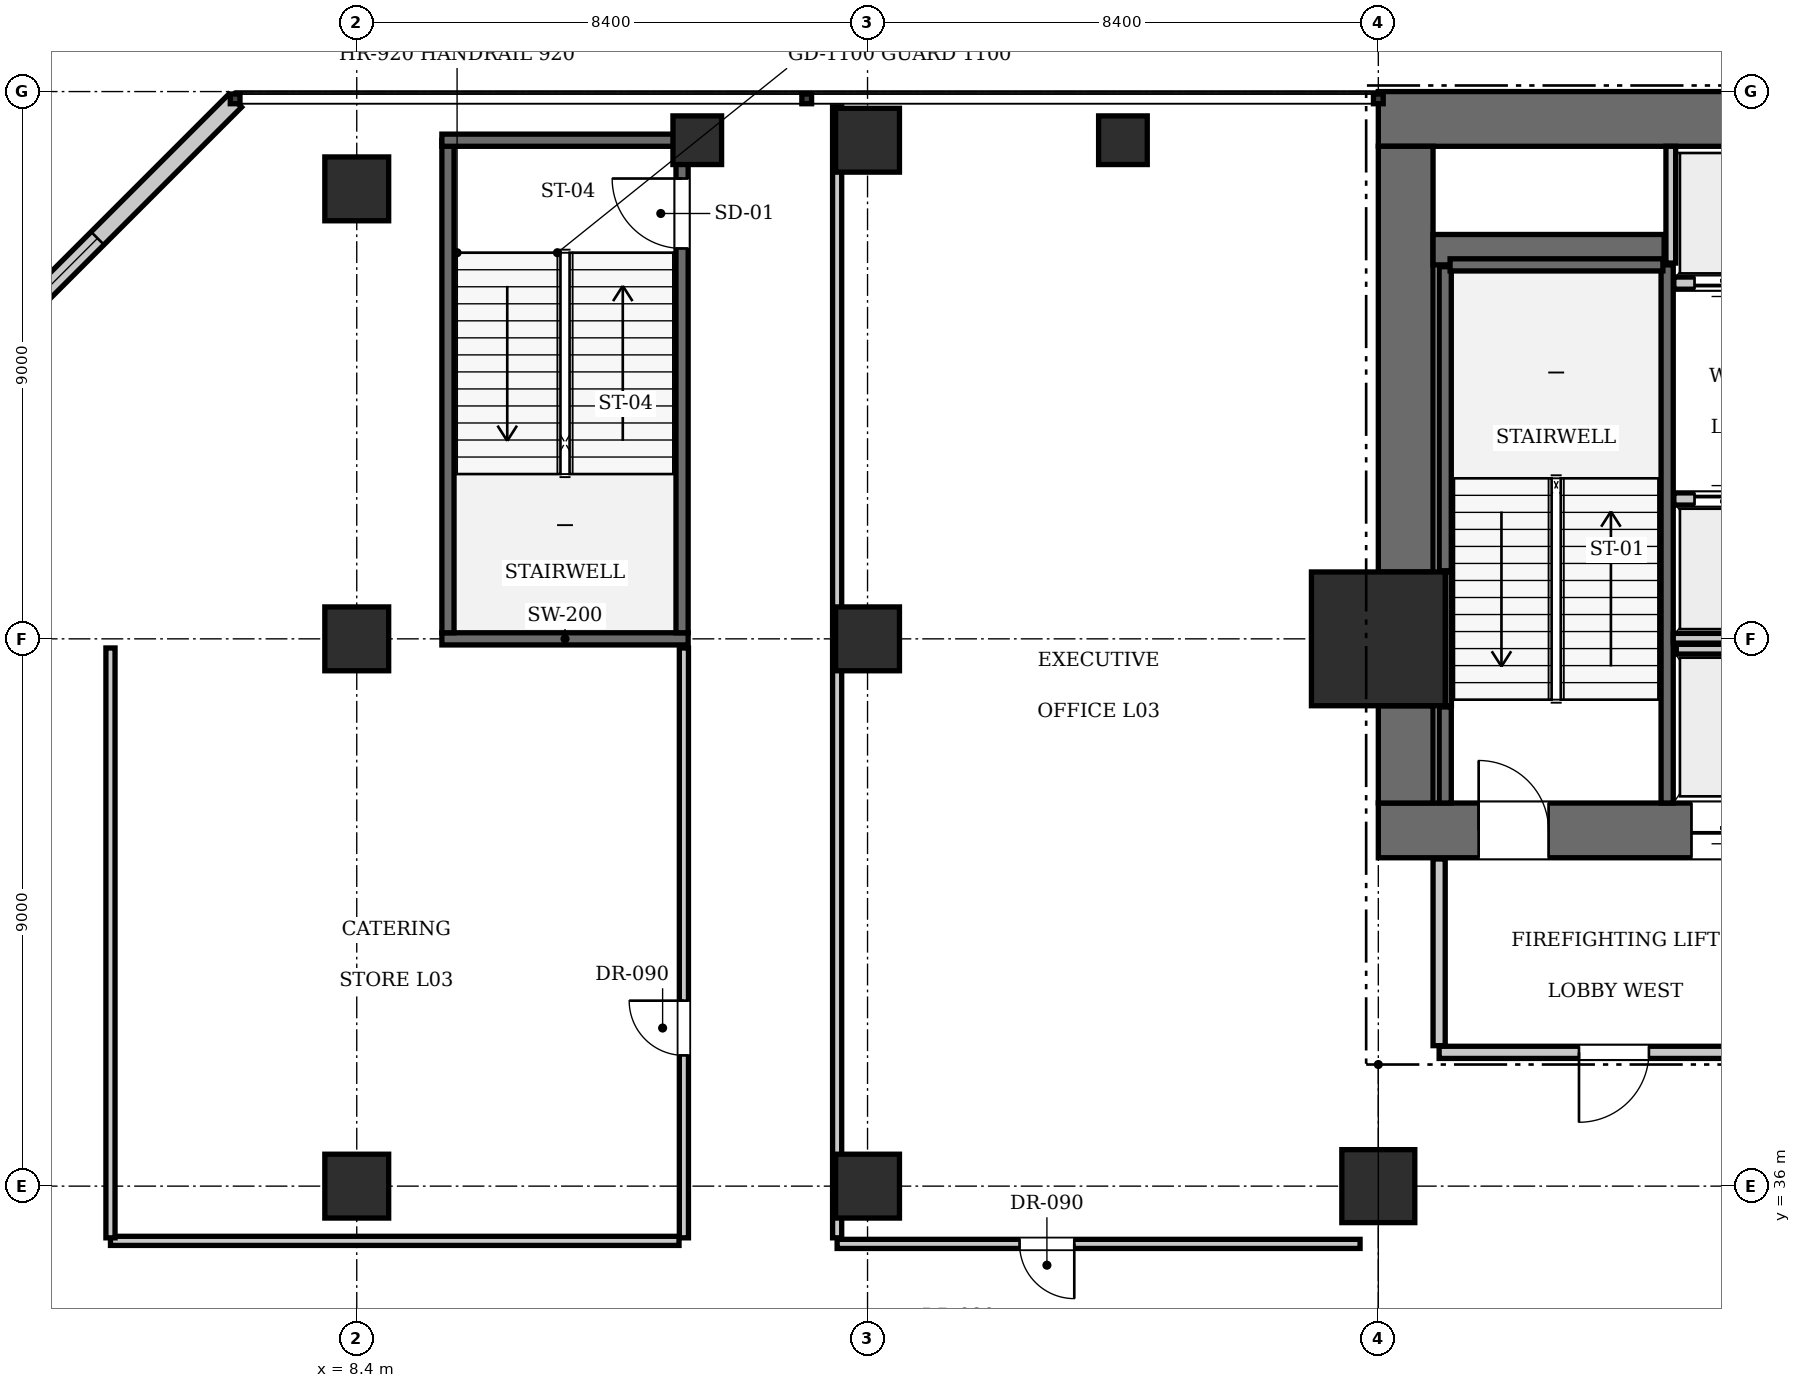
"""IFC4 building model, lengths in metres.
Left out: names, types, materials, properties, quantities, classifications, styles, units other than length and angle.
Written with IfcOpenShell. Run it as: python <this file> out.ifc"""

import sys

from ifc_helpers import new_model, si_unit, direction, frame, frame_2d, origin, origin_2d, place, context, subcontext, project, spatial, rectangle, extrude, element, fill, save


model = new_model("IFC4")
c1 = context("Model", 3, precision=1e-05, world=origin(), true_north=direction((0.0, 1.0)))
c2 = subcontext(c1, "Body", "Model", "MODEL_VIEW")
j1 = project(units=[si_unit("LENGTHUNIT", "METRE"), si_unit("PLANEANGLEUNIT", "RADIAN")], contexts=[c1])
p1 = place(None, origin())
s1 = spatial("IfcSite", under=j1, at=p1, CompositionType="ELEMENT")
p2 = place(p1, origin())
s2 = spatial("IfcBuilding", under=s1, at=p2, CompositionType="ELEMENT")
p3 = place(p2, frame((0.0, 0.0, 16.45)))
s3 = spatial("IfcBuildingStorey", under=s2, at=p3, CompositionType="ELEMENT", Elevation=16.45)
p4 = place(p3, frame((25.2, 45.0, 0.0), z_axis=(0.0, 0.0, 1.0), x_axis=(1.0, 0.0, 0.0)))
e1 = element("IfcColumn", 1, at=p4, inside=s3, PredefinedType="COLUMN", context=c2, shape_type="SweptSolid", body=[
    extrude(rectangle(XDim=2.2, YDim=2.2, at=origin_2d()), origin(), (0.0, 0.0, 1.0), 4.9),
])
p5 = place(p3, frame((25.2, 53.55, 0.0), z_axis=(0.0, 0.0, 1.0), x_axis=(1.0, 0.0, 0.0)))
e2 = element("IfcWall", 2, at=p5, inside=s3, PredefinedType="SHEAR", context=c2, shape_type="SweptSolid", body=[
    extrude(rectangle(XDim=25.2, YDim=0.9, at=frame_2d((12.6, 0.0))), origin(), (0.0, 0.0, 1.0), 4.9),
])
p6 = place(p3, frame((25.2, 41.85, 0.0), z_axis=(0.0, 0.0, 1.0), x_axis=(1.0, 0.0, 0.0)))
e3 = element("IfcWall", 3, at=p6, inside=s3, PredefinedType="SHEAR", context=c2, shape_type="SweptSolid", body=[
    extrude(rectangle(XDim=6.8, YDim=0.9, at=frame_2d((3.4, 0.0))), origin(), (0.0, 0.0, 1.0), 4.9),
])
p7 = place(p6, frame((1.65, 0.0, 0.0)))
e4 = element("IfcOpeningElement", 4, at=p7, cuts=e3, PredefinedType="OPENING", context=c2, shape_type="SweptSolid", body=[
    extrude(rectangle(XDim=1.15, YDim=2.15, at=frame_2d((0.575, 1.075))), frame((0.0, 0.46, 0.0), z_axis=(0.0, -1.0, 0.0), x_axis=(1.0, 0.0, 0.0)), (0.0, 0.0, 1.0), 0.92),
])
p8 = place(p6, frame((5.15, 0.0, 0.0)))
e5 = element("IfcOpeningElement", 5, at=p8, cuts=e3, PredefinedType="OPENING", context=c2, shape_type="SweptSolid", body=[
    extrude(rectangle(XDim=1.1, YDim=2.2, at=frame_2d((0.55, 1.1))), frame((0.0, 0.46, 0.0), z_axis=(0.0, -1.0, 0.0), x_axis=(1.0, 0.0, 0.0)), (0.0, 0.0, 1.0), 0.92),
])
p9 = place(p3, frame((25.65, 42.3, 0.0), z_axis=(0.0, 0.0, 1.0), x_axis=(0.0, 1.0, 0.0)))
e6 = element("IfcWall", 6, at=p9, inside=s3, PredefinedType="SHEAR", context=c2, shape_type="SweptSolid", body=[
    extrude(rectangle(XDim=1.6, YDim=0.9, at=frame_2d((0.8, 0.0))), origin(), (0.0, 0.0, 1.0), 4.9),
])
p10 = place(p3, frame((25.65, 46.1, 0.0), z_axis=(0.0, 0.0, 1.0), x_axis=(0.0, 1.0, 0.0)))
e7 = element("IfcWall", 7, at=p10, inside=s3, PredefinedType="SHEAR", context=c2, shape_type="SweptSolid", body=[
    extrude(rectangle(XDim=7.0, YDim=0.9, at=frame_2d((3.5, 0.0))), origin(), (0.0, 0.0, 1.0), 4.9),
])
p11 = place(p3, frame((26.1, 51.4, 0.0), z_axis=(0.0, 0.0, 1.0), x_axis=(1.0, 0.0, 0.0)))
e8 = element("IfcWall", 8, at=p11, inside=s3, PredefinedType="SHEAR", context=c2, shape_type="SweptSolid", body=[
    extrude(rectangle(XDim=3.8, YDim=0.5, at=frame_2d((1.9, 0.0))), origin(), (0.0, 0.0, 1.0), 4.9),
])
p12 = place(p3, frame((25.2, 36.0, 0.0), z_axis=(0.0, 0.0, 1.0), x_axis=(1.0, 0.0, 0.0)))
e9 = element("IfcColumn", 9, at=p12, inside=s3, PredefinedType="COLUMN", context=c2, shape_type="SweptSolid", body=[
    extrude(rectangle(XDim=1.2, YDim=1.2, at=origin_2d()), origin(), (0.0, 0.0, 1.0), 4.9),
])
for number, where, z_axis, x_axis in (
    (10, (16.8, 36.0, 0.0), (0.0, 0.0, 1.0), (1.0, 0.0, 0.0)),
    (11, (16.8, 45.0, 0.0), (0.0, 0.0, 1.0), (1.0, 0.0, 0.0)),
    (12, (8.4, 36.0, 0.0), (0.0, 0.0, 1.0), (1.0, 0.0, 0.0)),
    (13, (8.4, 45.0, 0.0), (0.0, 0.0, 1.0), (1.0, 0.0, 0.0)),
    (14, (8.4, 52.4, 0.0), (0.0, 0.0, 1.0), (1.0, 0.0, 0.0)),
    (15, (16.8, 53.2, 0.0), (0.0, 0.0, 1.0), (1.0, 0.0, 0.0)),
):
    element("IfcColumn", number, at=place(p3, frame(where, z_axis=z_axis, x_axis=x_axis)), inside=s3, PredefinedType="COLUMN", context=c2, shape_type="SweptSolid", body=[
        extrude(rectangle(XDim=1.05, YDim=1.05, at=origin_2d()), origin(), (0.0, 0.0, 1.0), 4.9),
    ])
for number, where, z_axis, x_axis in (
    (16, (14.0, 53.2, 0.0), (0.0, 0.0, 1.0), (1.0, 0.0, 0.0)),
    (17, (21.0, 53.2, 0.0), (0.0, 0.0, 1.0), (1.0, 0.0, 0.0)),
):
    element("IfcColumn", number, at=place(p3, frame(where, z_axis=z_axis, x_axis=x_axis)), inside=s3, PredefinedType="PILASTER", context=c2, shape_type="SweptSolid", body=[
        extrude(rectangle(XDim=0.8, YDim=0.8, at=origin_2d()), origin(), (0.0, 0.0, 1.0), 4.9),
    ])
p13 = place(p3, frame((29.95, 42.3, 0.0), z_axis=(0.0, 0.0, 1.0), x_axis=(0.0, 1.0, 0.0)))
e18 = element("IfcWall", 18, at=p13, inside=s3, PredefinedType="SOLIDWALL", context=c2, shape_type="SweptSolid", body=[
    extrude(rectangle(XDim=8.85, YDim=0.2, at=frame_2d((4.425, 0.0))), origin(), (0.0, 0.0, 1.0), 4.62),
])
p14 = place(p3, frame((26.3, 42.3, 0.0), z_axis=(0.0, 0.0, 1.0), x_axis=(0.0, 1.0, 0.0)))
e19 = element("IfcWall", 19, at=p14, inside=s3, PredefinedType="SOLIDWALL", context=c2, shape_type="SweptSolid", body=[
    extrude(rectangle(XDim=1.58, YDim=0.2, at=frame_2d((0.79, 0.0))), origin(), (0.0, 0.0, 1.0), 4.62),
])
p15 = place(p3, frame((26.3, 46.12, 0.0), z_axis=(0.0, 0.0, 1.0), x_axis=(0.0, 1.0, 0.0)))
e20 = element("IfcWall", 20, at=p15, inside=s3, PredefinedType="SOLIDWALL", context=c2, shape_type="SweptSolid", body=[
    extrude(rectangle(XDim=5.0, YDim=0.2, at=frame_2d((2.5, 0.0))), origin(), (0.0, 0.0, 1.0), 4.62),
])
p16 = place(p3, frame((26.38, 51.15, 0.0), z_axis=(0.0, 0.0, 1.0), x_axis=(1.0, 0.0, 0.0)))
e21 = element("IfcWall", 21, at=p16, inside=s3, PredefinedType="SOLIDWALL", context=c2, shape_type="SweptSolid", body=[
    extrude(rectangle(XDim=3.5, YDim=0.2, at=frame_2d((1.75, 0.0))), origin(), (0.0, 0.0, 1.0), 4.62),
])
p17 = place(p3, frame((26.352, 43.9, 0.0), z_axis=(0.0, 0.0, 1.0), x_axis=(0.0, 1.0, 0.0)))
e22 = element("IfcWall", 22, at=p17, inside=s3, PredefinedType="SOLIDWALL", context=c2, shape_type="SweptSolid", body=[
    extrude(rectangle(XDim=2.2, YDim=0.1, at=frame_2d((1.1, 0.0))), origin(), (0.0, 0.0, 1.0), 4.62),
])
p18 = place(p3, frame((9.8, 45.0, 0.0), z_axis=(0.0, 0.0, 1.0), x_axis=(1.0, 0.0, 0.0)))
e23 = element("IfcWall", 23, at=p18, inside=s3, PredefinedType="SOLIDWALL", context=c2, shape_type="SweptSolid", body=[
    extrude(rectangle(XDim=4.05, YDim=0.2, at=frame_2d((2.025, 0.0))), origin(), (0.0, 0.0, 1.0), 3.985),
])
p19 = place(p3, frame((9.9, 45.1, 0.0), z_axis=(0.0, 0.0, 1.0), x_axis=(0.0, 1.0, 0.0)))
e24 = element("IfcWall", 24, at=p19, inside=s3, PredefinedType="SOLIDWALL", context=c2, shape_type="SweptSolid", body=[
    extrude(rectangle(XDim=8.1, YDim=0.2, at=frame_2d((4.05, 0.0))), origin(), (0.0, 0.0, 1.0), 4.62),
])
p20 = place(p3, frame((13.75, 45.1, 0.0), z_axis=(0.0, 0.0, 1.0), x_axis=(0.0, 1.0, 0.0)))
e25 = element("IfcWall", 25, at=p20, inside=s3, PredefinedType="SOLIDWALL", context=c2, shape_type="SweptSolid", body=[
    extrude(rectangle(XDim=8.1, YDim=0.2, at=frame_2d((4.05, 0.0))), origin(), (0.0, 0.0, 1.0), 4.62),
])
p21 = place(p20, frame((6.32, 0.0, 0.0)))
e26 = element("IfcOpeningElement", 26, at=p21, cuts=e25, PredefinedType="OPENING", context=c2, shape_type="SweptSolid", body=[
    extrude(rectangle(XDim=1.15, YDim=2.15, at=frame_2d((0.575, 1.075))), frame((0.0, 0.11, 0.0), z_axis=(0.0, -1.0, 0.0), x_axis=(1.0, 0.0, 0.0)), (0.0, 0.0, 1.0), 0.22),
])
p22 = place(p3, frame((9.8, 53.2, 0.0), z_axis=(0.0, 0.0, 1.0), x_axis=(1.0, 0.0, 0.0)))
e27 = element("IfcWall", 27, at=p22, inside=s3, PredefinedType="SOLIDWALL", context=c2, shape_type="SweptSolid", body=[
    extrude(rectangle(XDim=4.05, YDim=0.2, at=frame_2d((2.025, 0.0))), origin(), (0.0, 0.0, 1.0), 4.62),
])
p23 = place(p3, frame((30.06, 47.3, 0.0), z_axis=(0.0, 0.0, 1.0), x_axis=(1.0, 0.0, 0.0)))
e28 = element("IfcWall", 28, at=p23, inside=s3, PredefinedType="SOLIDWALL", context=c2, shape_type="SweptSolid", body=[
    extrude(rectangle(XDim=1.68, YDim=0.2, at=frame_2d((0.84, 0.0))), origin(), (0.0, 0.0, 1.0), 4.62),
])
p24 = place(p23, frame((0.34, 0.0, 0.0)))
e29 = element("IfcOpeningElement", 29, at=p24, cuts=e28, PredefinedType="OPENING", context=c2, shape_type="SweptSolid", body=[
    extrude(rectangle(XDim=1.0, YDim=2.15, at=frame_2d((0.5, 1.075))), frame((0.0, 0.11, 0.0), z_axis=(0.0, -1.0, 0.0), x_axis=(1.0, 0.0, 0.0)), (0.0, 0.0, 1.0), 0.22),
])
p25 = place(p3, frame((30.06, 50.85, 0.0), z_axis=(0.0, 0.0, 1.0), x_axis=(1.0, 0.0, 0.0)))
e30 = element("IfcWall", 30, at=p25, inside=s3, PredefinedType="SOLIDWALL", context=c2, shape_type="SweptSolid", body=[
    extrude(rectangle(XDim=1.68, YDim=0.2, at=frame_2d((0.84, 0.0))), origin(), (0.0, 0.0, 1.0), 4.62),
])
p26 = place(p25, frame((0.34, 0.0, 0.0)))
e31 = element("IfcOpeningElement", 31, at=p26, cuts=e30, PredefinedType="OPENING", context=c2, shape_type="SweptSolid", body=[
    extrude(rectangle(XDim=1.0, YDim=2.15, at=frame_2d((0.5, 1.075))), frame((0.0, 0.11, 0.0), z_axis=(0.0, -1.0, 0.0), x_axis=(1.0, 0.0, 0.0)), (0.0, 0.0, 1.0), 0.22),
])
p27 = place(p3, frame((30.1, 44.83, 0.0), z_axis=(0.0, 0.0, 1.0), x_axis=(1.0, 0.0, 0.0)))
e32 = element("IfcWall", 32, at=p27, inside=s3, PredefinedType="SOLIDWALL", context=c2, shape_type="SweptSolid", body=[
    extrude(rectangle(XDim=1.6, YDim=0.16, at=frame_2d((0.8, 0.0))), origin(), (0.0, 0.0, 1.0), 4.62),
])
p28 = place(p3, frame((30.05, 45.01, 0.0), z_axis=(0.0, 0.0, 1.0), x_axis=(1.0, 0.0, 0.0)))
e33 = element("IfcWall", 33, at=p28, inside=s3, PredefinedType="SOLIDWALL", context=c2, shape_type="SweptSolid", body=[
    extrude(rectangle(XDim=3.45, YDim=0.16, at=frame_2d((1.725, 0.0))), origin(), (0.0, 0.0, 1.0), 4.62),
])
p29 = place(p3, frame((30.01, 51.18, 0.0), z_axis=(0.0, 0.0, 1.0), x_axis=(0.0, 1.0, 0.0)))
e34 = element("IfcWall", 34, at=p29, inside=s3, PredefinedType="SOLIDWALL", context=c2, shape_type="SweptSolid", body=[
    extrude(rectangle(XDim=1.92, YDim=0.16, at=frame_2d((0.96, 0.0))), origin(), (0.0, 0.0, 1.0), 4.62),
])
p30 = place(p3, frame((6.4, 53.85, 0.0), z_axis=(0.0, 0.0, 1.0), x_axis=(-0.707106781187, -0.707106781187, 0.0)))
e35 = element("IfcWall", 35, at=p30, inside=s3, PredefinedType="SOLIDWALL", context=c2, shape_type="SweptSolid", body=[
    extrude(rectangle(XDim=8.839, YDim=0.3, at=frame_2d((4.419, 0.0))), origin(), (0.0, 0.0, 1.0), 4.62),
])
p31 = place(p30, frame((3.2, 0.0, 0.9)))
e36 = element("IfcOpeningElement", 36, at=p31, cuts=e35, PredefinedType="OPENING", context=c2, shape_type="SweptSolid", body=[
    extrude(rectangle(XDim=2.4, YDim=2.6, at=frame_2d((1.2, 1.3))), frame((0.0, 0.16, 0.0), z_axis=(0.0, -1.0, 0.0), x_axis=(1.0, 0.0, 0.0)), (0.0, 0.0, 1.0), 0.32),
])
p32 = place(p3, frame((26.2, 38.2, 0.0), z_axis=(0.0, 0.0, 1.0), x_axis=(1.0, 0.0, 0.0)))
e37 = element("IfcWall", 37, at=p32, inside=s3, PredefinedType="PARTITIONING", context=c2, shape_type="SweptSolid", body=[
    extrude(rectangle(XDim=5.8, YDim=0.2, at=frame_2d((2.9, 0.0))), origin(), (0.0, 0.0, 1.0), 4.62),
])
p33 = place(p32, frame((2.3, 0.0, 0.0)))
e38 = element("IfcOpeningElement", 38, at=p33, cuts=e37, PredefinedType="OPENING", context=c2, shape_type="SweptSolid", body=[
    extrude(rectangle(XDim=1.15, YDim=2.15, at=frame_2d((0.575, 1.075))), frame((0.0, 0.11, 0.0), z_axis=(0.0, -1.0, 0.0), x_axis=(1.0, 0.0, 0.0)), (0.0, 0.0, 1.0), 0.22),
])
p34 = place(p3, frame((26.2, 38.31, 0.0), z_axis=(0.0, 0.0, 1.0), x_axis=(0.0, 1.0, 0.0)))
e39 = element("IfcWall", 39, at=p34, inside=s3, PredefinedType="PARTITIONING", context=c2, shape_type="SweptSolid", body=[
    extrude(rectangle(XDim=3.07, YDim=0.2, at=frame_2d((1.535, 0.0))), origin(), (0.0, 0.0, 1.0), 4.62),
])
p35 = place(p3, frame((16.3, 35.05, 0.0), z_axis=(0.0, 0.0, 1.0), x_axis=(1.0, 0.0, 0.0)))
e40 = element("IfcWall", 40, at=p35, inside=s3, PredefinedType="PARTITIONING", context=c2, shape_type="SweptSolid", body=[
    extrude(rectangle(XDim=8.6, YDim=0.15, at=frame_2d((4.3, 0.0))), origin(), (0.0, 0.0, 1.0), 4.62),
])
p36 = place(p35, frame((3.0, 0.0, 0.0)))
e41 = element("IfcOpeningElement", 41, at=p36, cuts=e40, PredefinedType="OPENING", context=c2, shape_type="SweptSolid", body=[
    extrude(rectangle(XDim=0.9, YDim=2.1, at=frame_2d((0.45, 1.05))), frame((0.0, 0.085, 0.0), z_axis=(0.0, -1.0, 0.0), x_axis=(1.0, 0.0, 0.0)), (0.0, 0.0, 1.0), 0.17),
])
p37 = place(p3, frame((16.3, 35.15, 0.0), z_axis=(0.0, 0.0, 1.0), x_axis=(0.0, 1.0, 0.0)))
e42 = element("IfcWall", 42, at=p37, inside=s3, PredefinedType="PARTITIONING", context=c2, shape_type="SweptSolid", body=[
    extrude(rectangle(XDim=18.6, YDim=0.15, at=frame_2d((9.3, 0.0))), origin(), (0.0, 0.0, 1.0), 4.62),
])
p38 = place(p3, frame((13.78, 35.15, 0.0), z_axis=(0.0, 0.0, 1.0), x_axis=(0.0, 1.0, 0.0)))
e43 = element("IfcWall", 43, at=p38, inside=s3, PredefinedType="PARTITIONING", context=c2, shape_type="SweptSolid", body=[
    extrude(rectangle(XDim=9.7, YDim=0.15, at=frame_2d((4.85, 0.0))), origin(), (0.0, 0.0, 1.0), 4.62),
])
p39 = place(p38, frame((3.0, 0.0, 0.0)))
e44 = element("IfcOpeningElement", 44, at=p39, cuts=e43, PredefinedType="OPENING", context=c2, shape_type="SweptSolid", body=[
    extrude(rectangle(XDim=0.9, YDim=2.1, at=frame_2d((0.45, 1.05))), frame((0.0, 0.085, 0.0), z_axis=(0.0, -1.0, 0.0), x_axis=(1.0, 0.0, 0.0)), (0.0, 0.0, 1.0), 0.17),
])
p40 = place(p3, frame((4.35, 35.1, 0.0), z_axis=(0.0, 0.0, 1.0), x_axis=(1.0, 0.0, 0.0)))
e45 = element("IfcWall", 45, at=p40, inside=s3, PredefinedType="PARTITIONING", context=c2, shape_type="SweptSolid", body=[
    extrude(rectangle(XDim=9.35, YDim=0.15, at=frame_2d((4.675, 0.0))), origin(), (0.0, 0.0, 1.0), 4.62),
])
p41 = place(p3, frame((4.35, 35.15, 0.0), z_axis=(0.0, 0.0, 1.0), x_axis=(0.0, 1.0, 0.0)))
e46 = element("IfcWall", 46, at=p41, inside=s3, PredefinedType="PARTITIONING", context=c2, shape_type="SweptSolid", body=[
    extrude(rectangle(XDim=9.7, YDim=0.15, at=frame_2d((4.85, 0.0))), origin(), (0.0, 0.0, 1.0), 4.62),
])
p42 = place(p7, origin())
e47 = element("IfcDoor", 47, at=p42, inside=s3, OperationType="SINGLE_SWING_LEFT", PredefinedType="DOOR", context=c2, shape_type="SweptSolid", body=[
    extrude(rectangle(XDim=1.15, YDim=2.15, at=frame_2d((0.575, 1.075))), frame((0.0, 0.025, 0.0), z_axis=(0.0, -1.0, 0.0), x_axis=(1.0, 0.0, 0.0)), (0.0, 0.0, 1.0), 0.05),
])
fill(e4, e47)
p43 = place(p21, origin())
e48 = element("IfcDoor", 48, at=p43, inside=s3, OperationType="SINGLE_SWING_RIGHT", PredefinedType="DOOR", context=c2, shape_type="SweptSolid", body=[
    extrude(rectangle(XDim=1.15, YDim=2.15, at=frame_2d((0.575, 1.075))), frame((0.0, 0.025, 0.0), z_axis=(0.0, -1.0, 0.0), x_axis=(1.0, 0.0, 0.0)), (0.0, 0.0, 1.0), 0.05),
])
fill(e26, e48)
p44 = place(p24, origin())
e49 = element("IfcDoor", 49, at=p44, inside=s3, OperationType="SLIDING_TO_LEFT", PredefinedType="DOOR", context=c2, shape_type="SweptSolid", body=[
    extrude(rectangle(XDim=1.0, YDim=2.15, at=frame_2d((0.5, 1.075))), frame((0.0, 0.025, 0.0), z_axis=(0.0, -1.0, 0.0), x_axis=(1.0, 0.0, 0.0)), (0.0, 0.0, 1.0), 0.05),
])
fill(e29, e49)
p45 = place(p26, frame((1.0, 0.0, 0.0), z_axis=(0.0, 0.0, 1.0), x_axis=(-1.0, 0.0, 0.0)))
e50 = element("IfcDoor", 50, at=p45, inside=s3, OperationType="SLIDING_TO_LEFT", PredefinedType="DOOR", context=c2, shape_type="SweptSolid", body=[
    extrude(rectangle(XDim=1.0, YDim=2.15, at=frame_2d((0.5, 1.075))), frame((0.0, 0.025, 0.0), z_axis=(0.0, -1.0, 0.0), x_axis=(1.0, 0.0, 0.0)), (0.0, 0.0, 1.0), 0.05),
])
fill(e31, e50)
p46 = place(p8, frame((1.1, 0.0, 0.0), z_axis=(0.0, 0.0, 1.0), x_axis=(-1.0, 0.0, 0.0)))
e51 = element("IfcDoor", 51, at=p46, inside=s3, OperationType="SLIDING_TO_LEFT", PredefinedType="DOOR", context=c2, shape_type="SweptSolid", body=[
    extrude(rectangle(XDim=1.1, YDim=2.2, at=frame_2d((0.55, 1.1))), frame((0.0, 0.025, 0.0), z_axis=(0.0, -1.0, 0.0), x_axis=(1.0, 0.0, 0.0)), (0.0, 0.0, 1.0), 0.05),
])
fill(e5, e51)
p47 = place(p31, origin())
e52 = element("IfcWindow", 52, at=p47, inside=s3, PartitioningType="SINGLE_PANEL", PredefinedType="WINDOW", context=c2, shape_type="SweptSolid", body=[
    extrude(rectangle(XDim=2.4, YDim=2.6, at=frame_2d((1.2, 1.3))), frame((0.0, 0.03, 0.0), z_axis=(0.0, -1.0, 0.0), x_axis=(1.0, 0.0, 0.0)), (0.0, 0.0, 1.0), 0.06),
])
fill(e36, e52)
p48 = place(p33, frame((1.15, 0.0, 0.0), z_axis=(0.0, 0.0, 1.0), x_axis=(-1.0, 0.0, 0.0)))
e53 = element("IfcDoor", 53, at=p48, inside=s3, OperationType="SINGLE_SWING_RIGHT", PredefinedType="DOOR", context=c2, shape_type="SweptSolid", body=[
    extrude(rectangle(XDim=1.15, YDim=2.15, at=frame_2d((0.575, 1.075))), frame((0.0, 0.025, 0.0), z_axis=(0.0, -1.0, 0.0), x_axis=(1.0, 0.0, 0.0)), (0.0, 0.0, 1.0), 0.05),
])
fill(e38, e53)
p49 = place(p36, frame((0.9, 0.0, 0.0), z_axis=(0.0, 0.0, 1.0), x_axis=(-1.0, 0.0, 0.0)))
e54 = element("IfcDoor", 54, at=p49, inside=s3, OperationType="SINGLE_SWING_LEFT", PredefinedType="DOOR", context=c2, shape_type="SweptSolid", body=[
    extrude(rectangle(XDim=0.9, YDim=2.1, at=frame_2d((0.45, 1.05))), frame((0.0, 0.025, 0.0), z_axis=(0.0, -1.0, 0.0), x_axis=(1.0, 0.0, 0.0)), (0.0, 0.0, 1.0), 0.05),
])
fill(e41, e54)
p50 = place(p39, origin())
e55 = element("IfcDoor", 55, at=p50, inside=s3, OperationType="SINGLE_SWING_RIGHT", PredefinedType="DOOR", context=c2, shape_type="SweptSolid", body=[
    extrude(rectangle(XDim=0.9, YDim=2.1, at=frame_2d((0.45, 1.05))), frame((0.0, 0.025, 0.0), z_axis=(0.0, -1.0, 0.0), x_axis=(1.0, 0.0, 0.0)), (0.0, 0.0, 1.0), 0.05),
])
fill(e44, e55)
save(model, sys.argv[1])
